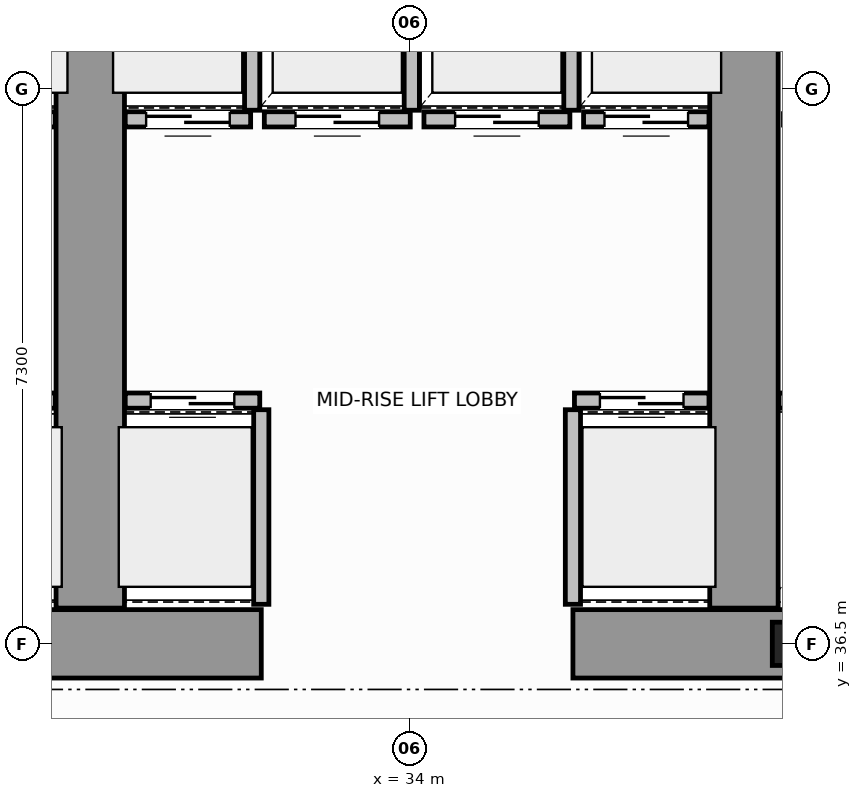
"""IFC4 building model, lengths in metres.
Left out: names, types, materials, properties, quantities, classifications, styles, units other than length and angle.
Written with IfcOpenShell. Run it as: python <this file> out.ifc"""

import sys

from ifc_helpers import new_model, si_unit, direction, frame, frame_2d, origin, origin_2d, place, context, subcontext, project, spatial, rectangle, i_section, extrude, source, transform, mapped, element, fill, save


model = new_model("IFC4")
c1 = context("Model", 3, precision=1e-05, world=origin(), true_north=direction((0.0, 1.0)))
c2 = subcontext(c1, "Body", "Model", "MODEL_VIEW")
j1 = project(units=[si_unit("LENGTHUNIT", "METRE"), si_unit("PLANEANGLEUNIT", "RADIAN")], contexts=[c1])
p1 = place(None, origin())
s1 = spatial("IfcSite", under=j1, at=p1, CompositionType="ELEMENT")
p2 = place(p1, origin())
s2 = spatial("IfcBuilding", under=s1, at=p2, CompositionType="ELEMENT")
p3 = place(p2, frame((0.0, 0.0, 10.0)))
s3 = spatial("IfcBuildingStorey", under=s2, at=p3, CompositionType="ELEMENT", Elevation=10.0)
m1 = source(origin(), c2, "Body", "SweptSolid", [
    extrude(i_section(OverallWidth=0.454, OverallDepth=0.569, WebThickness=0.078, FlangeThickness=0.08, FilletRadius=0.015, at=origin_2d()), origin(), (0.0, 0.0, 1.0), 4.4),
])
p4 = place(p3, frame((39.0, 36.5, 0.0), z_axis=(0.0, 0.0, 1.0), x_axis=(1.0, 0.0, 0.0)))
e1 = element("IfcColumn", 1, at=p4, inside=s3, PredefinedType="COLUMN", context=c2, shape_type="MappedRepresentation", body=[
    mapped(m1, transform((0.0, 0.0, 0.0), scale=1.0)),
])
for number, where, z_axis, x_axis in (
    (2, (27.55, 36.5, 0.0), (0.0, 0.0, 1.0), (1.0, 0.0, 0.0)),
    (3, (36.15, 36.5, 0.0), (0.0, 0.0, 1.0), (1.0, 0.0, 0.0)),
):
    element("IfcWall", number, at=place(p3, frame(where, z_axis=z_axis, x_axis=x_axis)), inside=s3, PredefinedType="SHEAR", context=c2, shape_type="SweptSolid", body=[
        extrude(rectangle(XDim=4.5, YDim=0.9, at=frame_2d((2.25, 0.0))), origin(), (0.0, 0.0, 1.0), 4.4),
    ])
for number, where, z_axis, x_axis in (
    (4, (29.8, 36.97, 0.0), (0.0, 0.0, 1.0), (0.0, 1.0, 0.0)),
    (5, (38.4, 36.97, 0.0), (0.0, 0.0, 1.0), (0.0, 1.0, 0.0)),
):
    element("IfcWall", number, at=place(p3, frame(where, z_axis=z_axis, x_axis=x_axis)), inside=s3, PredefinedType="SHEAR", context=c2, shape_type="SweptSolid", body=[
        extrude(rectangle(XDim=9.23, YDim=0.9, at=frame_2d((4.615, 0.0))), origin(), (0.0, 0.0, 1.0), 4.4),
    ])
p5 = place(p3, frame((27.57, 39.7, 0.0), z_axis=(0.0, 0.0, 1.0), x_axis=(1.0, 0.0, 0.0)))
e6 = element("IfcWall", 6, at=p5, inside=s3, PredefinedType="SOLIDWALL", context=c2, shape_type="SweptSolid", body=[
    extrude(rectangle(XDim=1.77, YDim=0.2, at=frame_2d((0.885, 0.0))), origin(), (0.0, 0.0, 1.0), 4.12),
])
p6 = place(p5, frame((0.335, 0.0, 0.0)))
e7 = element("IfcOpeningElement", 7, at=p6, cuts=e6, PredefinedType="OPENING", context=c2, shape_type="SweptSolid", body=[
    extrude(rectangle(XDim=1.1, YDim=2.15, at=frame_2d((0.55, 1.075))), frame((0.0, 0.11, 0.0), z_axis=(0.0, -1.0, 0.0), x_axis=(1.0, 0.0, 0.0)), (0.0, 0.0, 1.0), 0.22),
])
p7 = place(p3, frame((27.69, 43.4, 0.0), z_axis=(0.0, 0.0, 1.0), x_axis=(1.0, 0.0, 0.0)))
e8 = element("IfcWall", 8, at=p7, inside=s3, PredefinedType="SOLIDWALL", context=c2, shape_type="SweptSolid", body=[
    extrude(rectangle(XDim=1.65, YDim=0.2, at=frame_2d((0.825, 0.0))), origin(), (0.0, 0.0, 1.0), 4.12),
])
p8 = place(p7, frame((0.275, 0.0, 0.0)))
e9 = element("IfcOpeningElement", 9, at=p8, cuts=e8, PredefinedType="OPENING", context=c2, shape_type="SweptSolid", body=[
    extrude(rectangle(XDim=1.1, YDim=2.15, at=frame_2d((0.55, 1.075))), frame((0.0, 0.11, 0.0), z_axis=(0.0, -1.0, 0.0), x_axis=(1.0, 0.0, 0.0)), (0.0, 0.0, 1.0), 0.22),
])
p9 = place(p3, frame((30.26, 39.7, 0.0), z_axis=(0.0, 0.0, 1.0), x_axis=(1.0, 0.0, 0.0)))
e10 = element("IfcWall", 10, at=p9, inside=s3, PredefinedType="SOLIDWALL", context=c2, shape_type="SweptSolid", body=[
    extrude(rectangle(XDim=1.77, YDim=0.2, at=frame_2d((0.885, 0.0))), origin(), (0.0, 0.0, 1.0), 4.12),
])
p10 = place(p9, frame((0.335, 0.0, 0.0)))
e11 = element("IfcOpeningElement", 11, at=p10, cuts=e10, PredefinedType="OPENING", context=c2, shape_type="SweptSolid", body=[
    extrude(rectangle(XDim=1.1, YDim=2.15, at=frame_2d((0.55, 1.075))), frame((0.0, 0.11, 0.0), z_axis=(0.0, -1.0, 0.0), x_axis=(1.0, 0.0, 0.0)), (0.0, 0.0, 1.0), 0.22),
])
p11 = place(p3, frame((32.05, 37.02, 0.0), z_axis=(0.0, 0.0, 1.0), x_axis=(0.0, 1.0, 0.0)))
e12 = element("IfcWall", 12, at=p11, inside=s3, PredefinedType="SOLIDWALL", context=c2, shape_type="SweptSolid", body=[
    extrude(rectangle(XDim=2.56, YDim=0.2, at=frame_2d((1.28, 0.0))), origin(), (0.0, 0.0, 1.0), 4.12),
])
p12 = place(p3, frame((36.17, 39.7, 0.0), z_axis=(0.0, 0.0, 1.0), x_axis=(1.0, 0.0, 0.0)))
e13 = element("IfcWall", 13, at=p12, inside=s3, PredefinedType="SOLIDWALL", context=c2, shape_type="SweptSolid", body=[
    extrude(rectangle(XDim=1.77, YDim=0.2, at=frame_2d((0.885, 0.0))), origin(), (0.0, 0.0, 1.0), 4.12),
])
p13 = place(p12, frame((0.335, 0.0, 0.0)))
e14 = element("IfcOpeningElement", 14, at=p13, cuts=e13, PredefinedType="OPENING", context=c2, shape_type="SweptSolid", body=[
    extrude(rectangle(XDim=1.1, YDim=2.15, at=frame_2d((0.55, 1.075))), frame((0.0, 0.11, 0.0), z_axis=(0.0, -1.0, 0.0), x_axis=(1.0, 0.0, 0.0)), (0.0, 0.0, 1.0), 0.22),
])
p14 = place(p3, frame((36.15, 37.02, 0.0), z_axis=(0.0, 0.0, 1.0), x_axis=(0.0, 1.0, 0.0)))
e15 = element("IfcWall", 15, at=p14, inside=s3, PredefinedType="SOLIDWALL", context=c2, shape_type="SweptSolid", body=[
    extrude(rectangle(XDim=2.56, YDim=0.2, at=frame_2d((1.28, 0.0))), origin(), (0.0, 0.0, 1.0), 4.12),
])
p15 = place(p3, frame((30.26, 43.4, 0.0), z_axis=(0.0, 0.0, 1.0), x_axis=(1.0, 0.0, 0.0)))
e16 = element("IfcWall", 16, at=p15, inside=s3, PredefinedType="SOLIDWALL", context=c2, shape_type="SweptSolid", body=[
    extrude(rectangle(XDim=1.65, YDim=0.2, at=frame_2d((0.825, 0.0))), origin(), (0.0, 0.0, 1.0), 4.12),
])
p16 = place(p15, frame((0.275, 0.0, 0.0)))
e17 = element("IfcOpeningElement", 17, at=p16, cuts=e16, PredefinedType="OPENING", context=c2, shape_type="SweptSolid", body=[
    extrude(rectangle(XDim=1.1, YDim=2.15, at=frame_2d((0.55, 1.075))), frame((0.0, 0.11, 0.0), z_axis=(0.0, -1.0, 0.0), x_axis=(1.0, 0.0, 0.0)), (0.0, 0.0, 1.0), 0.22),
])
p17 = place(p3, frame((31.93, 43.52, 0.0), z_axis=(0.0, 0.0, 1.0), x_axis=(0.0, 1.0, 0.0)))
e18 = element("IfcWall", 18, at=p17, inside=s3, PredefinedType="SOLIDWALL", context=c2, shape_type="SweptSolid", body=[
    extrude(rectangle(XDim=2.56, YDim=0.2, at=frame_2d((1.28, 0.0))), origin(), (0.0, 0.0, 1.0), 4.12),
])
p18 = place(p3, frame((32.09, 43.4, 0.0), z_axis=(0.0, 0.0, 1.0), x_axis=(1.0, 0.0, 0.0)))
e19 = element("IfcWall", 19, at=p18, inside=s3, PredefinedType="SOLIDWALL", context=c2, shape_type="SweptSolid", body=[
    extrude(rectangle(XDim=1.92, YDim=0.2, at=frame_2d((0.96, 0.0))), origin(), (0.0, 0.0, 1.0), 4.12),
])
p19 = place(p18, frame((0.41, 0.0, 0.0)))
e20 = element("IfcOpeningElement", 20, at=p19, cuts=e19, PredefinedType="OPENING", context=c2, shape_type="SweptSolid", body=[
    extrude(rectangle(XDim=1.1, YDim=2.15, at=frame_2d((0.55, 1.075))), frame((0.0, 0.11, 0.0), z_axis=(0.0, -1.0, 0.0), x_axis=(1.0, 0.0, 0.0)), (0.0, 0.0, 1.0), 0.22),
])
p20 = place(p3, frame((34.03, 43.52, 0.0), z_axis=(0.0, 0.0, 1.0), x_axis=(0.0, 1.0, 0.0)))
e21 = element("IfcWall", 21, at=p20, inside=s3, PredefinedType="SOLIDWALL", context=c2, shape_type="SweptSolid", body=[
    extrude(rectangle(XDim=2.56, YDim=0.2, at=frame_2d((1.28, 0.0))), origin(), (0.0, 0.0, 1.0), 4.12),
])
p21 = place(p3, frame((34.19, 43.4, 0.0), z_axis=(0.0, 0.0, 1.0), x_axis=(1.0, 0.0, 0.0)))
e22 = element("IfcWall", 22, at=p21, inside=s3, PredefinedType="SOLIDWALL", context=c2, shape_type="SweptSolid", body=[
    extrude(rectangle(XDim=1.92, YDim=0.2, at=frame_2d((0.96, 0.0))), origin(), (0.0, 0.0, 1.0), 4.12),
])
p22 = place(p21, frame((0.41, 0.0, 0.0)))
e23 = element("IfcOpeningElement", 23, at=p22, cuts=e22, PredefinedType="OPENING", context=c2, shape_type="SweptSolid", body=[
    extrude(rectangle(XDim=1.1, YDim=2.15, at=frame_2d((0.55, 1.075))), frame((0.0, 0.11, 0.0), z_axis=(0.0, -1.0, 0.0), x_axis=(1.0, 0.0, 0.0)), (0.0, 0.0, 1.0), 0.22),
])
p23 = place(p3, frame((36.13, 43.52, 0.0), z_axis=(0.0, 0.0, 1.0), x_axis=(0.0, 1.0, 0.0)))
e24 = element("IfcWall", 24, at=p23, inside=s3, PredefinedType="SOLIDWALL", context=c2, shape_type="SweptSolid", body=[
    extrude(rectangle(XDim=2.56, YDim=0.2, at=frame_2d((1.28, 0.0))), origin(), (0.0, 0.0, 1.0), 4.12),
])
p24 = place(p3, frame((36.29, 43.4, 0.0), z_axis=(0.0, 0.0, 1.0), x_axis=(1.0, 0.0, 0.0)))
e25 = element("IfcWall", 25, at=p24, inside=s3, PredefinedType="SOLIDWALL", context=c2, shape_type="SweptSolid", body=[
    extrude(rectangle(XDim=1.65, YDim=0.2, at=frame_2d((0.825, 0.0))), origin(), (0.0, 0.0, 1.0), 4.12),
])
p25 = place(p24, frame((0.275, 0.0, 0.0)))
e26 = element("IfcOpeningElement", 26, at=p25, cuts=e25, PredefinedType="OPENING", context=c2, shape_type="SweptSolid", body=[
    extrude(rectangle(XDim=1.1, YDim=2.15, at=frame_2d((0.55, 1.075))), frame((0.0, 0.11, 0.0), z_axis=(0.0, -1.0, 0.0), x_axis=(1.0, 0.0, 0.0)), (0.0, 0.0, 1.0), 0.22),
])
p26 = place(p3, frame((38.86, 39.7, 0.0), z_axis=(0.0, 0.0, 1.0), x_axis=(1.0, 0.0, 0.0)))
e27 = element("IfcWall", 27, at=p26, inside=s3, PredefinedType="SOLIDWALL", context=c2, shape_type="SweptSolid", body=[
    extrude(rectangle(XDim=1.77, YDim=0.2, at=frame_2d((0.885, 0.0))), origin(), (0.0, 0.0, 1.0), 4.12),
])
m2 = source(origin(), c2, "Body", "SweptSolid", [
    extrude(rectangle(XDim=1.1, YDim=2.15, at=frame_2d((0.55, 1.075))), frame((0.0, 0.025, 0.0), z_axis=(0.0, -1.0, 0.0), x_axis=(1.0, 0.0, 0.0)), (0.0, 0.0, 1.0), 0.05),
])
p27 = place(p10, origin())
e28 = element("IfcDoor", 28, at=p27, inside=s3, OperationType="DOUBLE_DOOR_SLIDING", PredefinedType="DOOR", context=c2, shape_type="MappedRepresentation", body=[
    mapped(m2, transform((0.0, 0.0, 0.0), scale=1.0)),
])
fill(e11, e28)
p28 = place(p13, origin())
e29 = element("IfcDoor", 29, at=p28, inside=s3, OperationType="DOUBLE_DOOR_SLIDING", PredefinedType="DOOR", context=c2, shape_type="MappedRepresentation", body=[
    mapped(m2, transform((0.0, 0.0, 0.0), scale=1.0)),
])
fill(e14, e29)
p29 = place(p16, origin())
e30 = element("IfcDoor", 30, at=p29, inside=s3, OperationType="DOUBLE_DOOR_SLIDING", PredefinedType="DOOR", context=c2, shape_type="MappedRepresentation", body=[
    mapped(m2, transform((0.0, 0.0, 0.0), scale=1.0)),
])
fill(e17, e30)
p30 = place(p19, origin())
e31 = element("IfcDoor", 31, at=p30, inside=s3, OperationType="DOUBLE_DOOR_SLIDING", PredefinedType="DOOR", context=c2, shape_type="MappedRepresentation", body=[
    mapped(m2, transform((0.0, 0.0, 0.0), scale=1.0)),
])
fill(e20, e31)
p31 = place(p22, origin())
e32 = element("IfcDoor", 32, at=p31, inside=s3, OperationType="DOUBLE_DOOR_SLIDING", PredefinedType="DOOR", context=c2, shape_type="MappedRepresentation", body=[
    mapped(m2, transform((0.0, 0.0, 0.0), scale=1.0)),
])
fill(e23, e32)
p32 = place(p25, origin())
e33 = element("IfcDoor", 33, at=p32, inside=s3, OperationType="DOUBLE_DOOR_SLIDING", PredefinedType="DOOR", context=c2, shape_type="MappedRepresentation", body=[
    mapped(m2, transform((0.0, 0.0, 0.0), scale=1.0)),
])
fill(e26, e33)
save(model, sys.argv[1])
